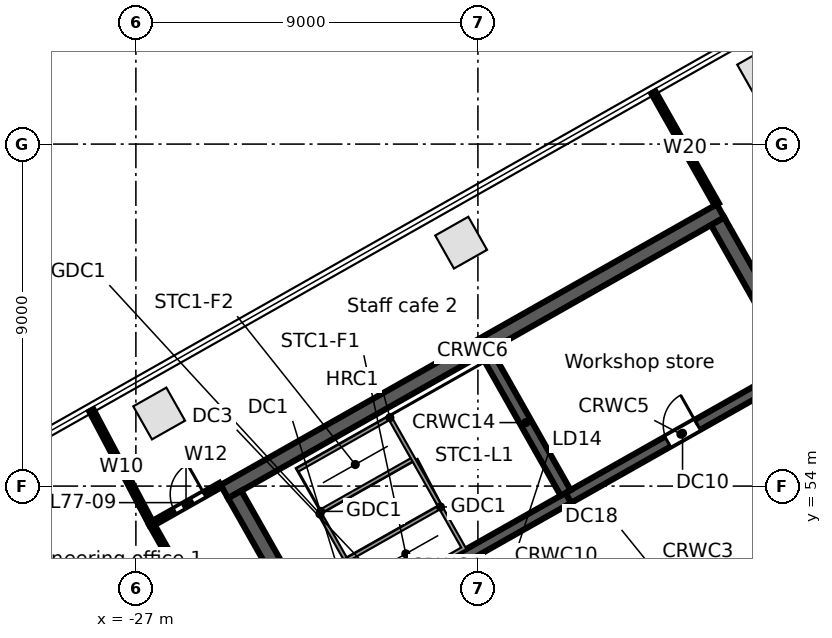
"""IFC4 building model, lengths in metres.
Left out: names, types, materials, properties, quantities, classifications, styles, units other than length and angle.
Written with IfcOpenShell. Run it as: python <this file> out.ifc"""

import sys

from ifc_helpers import new_model, si_unit, direction, frame, frame_2d, origin, origin_2d, place, context, subcontext, project, spatial, rectangle, extrude, element, fill, save


model = new_model("IFC4")
c1 = context("Model", 3, precision=1e-05, world=origin(), true_north=direction((0.0, 1.0)))
c2 = subcontext(c1, "Body", "Model", "MODEL_VIEW")
j1 = project(units=[si_unit("LENGTHUNIT", "METRE"), si_unit("PLANEANGLEUNIT", "RADIAN")], contexts=[c1])
p1 = place(None, origin())
s1 = spatial("IfcSite", under=j1, at=p1, CompositionType="ELEMENT")
p2 = place(p1, origin())
s2 = spatial("IfcBuilding", under=s1, at=p2, CompositionType="ELEMENT")
p3 = place(p2, frame((0.0, 0.0, 339.3)))
s3 = spatial("IfcBuildingStorey", under=s2, at=p3, CompositionType="ELEMENT", Elevation=339.3)
for number, where, z_axis, x_axis in (
    (1, (-10.495, 64.902, 0.0), (0.0, 0.0, 1.0), (-0.87, -0.492, 0.0)),
    (2, (-18.441, 60.406, 0.0), (0.0, 0.0, 1.0), (-0.87, -0.492, 0.0)),
    (3, (-26.388, 55.91, 0.0), (0.0, 0.0, 1.0), (-0.87, -0.492, 0.0)),
):
    element("IfcColumn", number, at=place(p3, frame(where, z_axis=z_axis, x_axis=x_axis)), inside=s3, PredefinedType="COLUMN", context=c2, shape_type="SweptSolid", body=[
        extrude(rectangle(XDim=1.0, YDim=1.0, at=origin_2d()), origin(), (0.0, 0.0, 1.0), 3.8),
    ])
p4 = place(p3, frame((-13.365, 49.911, 0.0), z_axis=(0.0, 0.0, 1.0), x_axis=(0.870347618718, 0.492437836272, 0.0)))
e4 = element("IfcWall", 4, at=p4, inside=s3, PredefinedType="SOLIDWALL", context=c2, shape_type="SweptSolid", body=[
    extrude(rectangle(XDim=6.7, YDim=0.3, at=frame_2d((3.35, 0.0))), origin(), (0.0, 0.0, 1.0), 3.52),
])
p5 = place(p4, frame((0.75, 0.0, 0.0)))
e5 = element("IfcOpeningElement", 5, at=p5, cuts=e4, PredefinedType="OPENING", context=c2, shape_type="SweptSolid", body=[
    extrude(rectangle(XDim=0.9, YDim=2.1, at=frame_2d((0.45, 1.05))), frame((0.0, 0.16, 0.0), z_axis=(0.0, -1.0, 0.0), x_axis=(1.0, 0.0, 0.0)), (0.0, 0.0, 1.0), 0.32),
])
p6 = place(p4, frame((3.15, 0.0, 0.0)))
e6 = element("IfcOpeningElement", 6, at=p6, cuts=e4, PredefinedType="OPENING", context=c2, shape_type="SweptSolid", body=[
    extrude(rectangle(XDim=0.9, YDim=2.1, at=frame_2d((0.45, 1.05))), frame((0.0, 0.16, 0.0), z_axis=(0.0, -1.0, 0.0), x_axis=(1.0, 0.0, 0.0)), (0.0, 0.0, 1.0), 0.32),
])
p7 = place(p4, frame((5.35, 0.0, 0.0)))
e7 = element("IfcOpeningElement", 7, at=p7, cuts=e4, PredefinedType="OPENING", context=c2, shape_type="SweptSolid", body=[
    extrude(rectangle(XDim=0.9, YDim=2.1, at=frame_2d((0.45, 1.05))), frame((0.0, 0.16, 0.0), z_axis=(0.0, -1.0, 0.0), x_axis=(1.0, 0.0, 0.0)), (0.0, 0.0, 1.0), 0.32),
])
p8 = place(p3, frame((-22.059, 50.047, 0.0), z_axis=(0.0, 0.0, 1.0), x_axis=(0.87035077051, 0.49243226567, 0.0)))
e8 = element("IfcWall", 8, at=p8, inside=s3, PredefinedType="SOLIDWALL", context=c2, shape_type="SweptSolid", body=[
    extrude(rectangle(XDim=7.4, YDim=0.3, at=frame_2d((3.7, 0.0))), origin(), (0.0, 0.0, 1.0), 3.52),
])
p9 = place(p8, frame((0.4, 0.0, 0.0)))
e9 = element("IfcOpeningElement", 9, at=p9, cuts=e8, PredefinedType="OPENING", context=c2, shape_type="SweptSolid", body=[
    extrude(rectangle(XDim=1.0, YDim=2.1, at=frame_2d((0.5, 1.05))), frame((0.0, 0.16, 0.0), z_axis=(0.0, -1.0, 0.0), x_axis=(1.0, 0.0, 0.0)), (0.0, 0.0, 1.0), 0.32),
])
p10 = place(p3, frame((-15.618, 53.691, 0.0), z_axis=(0.0, 0.0, 1.0), x_axis=(0.870362830851, 0.492410948978, 0.0)))
e10 = element("IfcWall", 10, at=p10, inside=s3, PredefinedType="SOLIDWALL", context=c2, shape_type="SweptSolid", body=[
    extrude(rectangle(XDim=6.8, YDim=0.3, at=frame_2d((3.4, 0.0))), origin(), (0.0, 0.0, 1.0), 3.52),
])
p11 = place(p10, frame((3.0, 0.0, 0.0)))
e11 = element("IfcOpeningElement", 11, at=p11, cuts=e10, PredefinedType="OPENING", context=c2, shape_type="SweptSolid", body=[
    extrude(rectangle(XDim=0.9, YDim=2.1, at=frame_2d((0.45, 1.05))), frame((0.0, 0.16, 0.0), z_axis=(0.0, -1.0, 0.0), x_axis=(1.0, 0.0, 0.0)), (0.0, 0.0, 1.0), 0.32),
])
p12 = place(p3, frame((-24.672, 53.854, 0.0), z_axis=(0.0, 0.0, 1.0), x_axis=(0.870353598469, 0.492427267353, 0.0)))
e12 = element("IfcWall", 12, at=p12, inside=s3, PredefinedType="SOLIDWALL", context=c2, shape_type="SweptSolid", body=[
    extrude(rectangle(XDim=15.0, YDim=0.4, at=frame_2d((7.5, 0.0))), origin(), (0.0, 0.0, 1.0), 3.52),
])
p13 = place(p3, frame((-24.4, 53.779, 0.0), z_axis=(0.0, 0.0, 1.0), x_axis=(0.492421663121, -0.870356769198, 0.0)))
e13 = element("IfcWall", 13, at=p13, inside=s3, PredefinedType="SOLIDWALL", context=c2, shape_type="SweptSolid", body=[
    extrude(rectangle(XDim=13.2, YDim=0.4, at=frame_2d((6.6, 0.0))), origin(), (0.0, 0.0, 1.0), 3.52),
])
p14 = place(p3, frame((-17.785, 57.521, 0.0), z_axis=(0.0, 0.0, 1.0), x_axis=(0.492422543467, -0.870356271124, 0.0)))
e14 = element("IfcWall", 14, at=p14, inside=s3, PredefinedType="SOLIDWALL", context=c2, shape_type="SweptSolid", body=[
    extrude(rectangle(XDim=4.25, YDim=0.3, at=frame_2d((2.125, 0.0))), origin(), (0.0, 0.0, 1.0), 3.52),
])
p15 = place(p3, frame((-11.692, 60.968, 0.0), z_axis=(0.0, 0.0, 1.0), x_axis=(0.492421663121, -0.870356769198, 0.0)))
e15 = element("IfcWall", 15, at=p15, inside=s3, PredefinedType="SOLIDWALL", context=c2, shape_type="SweptSolid", body=[
    extrude(rectangle(XDim=13.2, YDim=0.4, at=frame_2d((6.6, 0.0))), origin(), (0.0, 0.0, 1.0), 3.52),
])
p16 = place(p3, frame((-28.171, 55.993, 0.0), z_axis=(0.0, 0.0, 1.0), x_axis=(0.466919980712, -0.884299571193, 0.0)))
e16 = element("IfcWall", 16, at=p16, inside=s3, PredefinedType="PARTITIONING", context=c2, shape_type="SweptSolid", body=[
    extrude(rectangle(XDim=3.385, YDim=0.125, at=frame_2d((1.693, 0.0))), origin(), (0.0, 0.0, 1.0), 2.888),
])
p17 = place(p3, frame((-26.59, 52.999, 0.0), z_axis=(0.0, 0.0, 1.0), x_axis=(0.870384380082, 0.492372857609, 0.0)))
e17 = element("IfcWall", 17, at=p17, inside=s3, PredefinedType="PARTITIONING", context=c2, shape_type="SweptSolid", body=[
    extrude(rectangle(XDim=2.09, YDim=0.125, at=frame_2d((1.045, 0.0))), origin(), (0.0, 0.0, 1.0), 2.792),
])
p18 = place(p17, frame((0.7, 0.0, 0.0)))
e18 = element("IfcOpeningElement", 18, at=p18, cuts=e17, PredefinedType="OPENING", context=c2, shape_type="SweptSolid", body=[
    extrude(rectangle(XDim=0.9, YDim=2.1, at=frame_2d((0.45, 1.05))), frame((0.0, 0.073, 0.0), z_axis=(0.0, -1.0, 0.0), x_axis=(1.0, 0.0, 0.0)), (0.0, 0.0, 1.0), 0.145),
])
p19 = place(p3, frame((-26.59, 52.999, 0.0), z_axis=(0.0, 0.0, 1.0), x_axis=(0.492406341242, -0.870365437678, 0.0)))
e19 = element("IfcWall", 19, at=p19, inside=s3, PredefinedType="PARTITIONING", context=c2, shape_type="SweptSolid", body=[
    extrude(rectangle(XDim=5.0, YDim=0.125, at=frame_2d((2.5, 0.0))), origin(), (0.0, 0.0, 1.0), 3.52),
])
p20 = place(p19, frame((1.95, 0.0, 0.0)))
e20 = element("IfcOpeningElement", 20, at=p20, cuts=e19, PredefinedType="OPENING", context=c2, shape_type="SweptSolid", body=[
    extrude(rectangle(XDim=0.9, YDim=2.1, at=frame_2d((0.45, 1.05))), frame((0.0, 0.073, 0.0), z_axis=(0.0, -1.0, 0.0), x_axis=(1.0, 0.0, 0.0)), (0.0, 0.0, 1.0), 0.145),
])
p21 = place(p3, frame((-13.382, 64.36, 0.0), z_axis=(0.0, 0.0, 1.0), x_axis=(0.492468354667, -0.870330350874, 0.0)))
e21 = element("IfcWall", 21, at=p21, inside=s3, PredefinedType="PARTITIONING", context=c2, shape_type="SweptSolid", body=[
    extrude(rectangle(XDim=3.385, YDim=0.125, at=frame_2d((1.692, 0.0))), origin(), (0.0, 0.0, 1.0), 2.888),
])
p22 = place(p11, origin())
e22 = element("IfcDoor", 22, at=p22, inside=s3, OperationType="SINGLE_SWING_RIGHT", PredefinedType="DOOR", context=c2, shape_type="SweptSolid", body=[
    extrude(rectangle(XDim=0.9, YDim=2.1, at=frame_2d((0.45, 1.05))), frame((0.0, 0.025, 0.0), z_axis=(0.0, -1.0, 0.0), x_axis=(1.0, 0.0, 0.0)), (0.0, 0.0, 1.0), 0.05),
])
fill(e11, e22)
p23 = place(p18, origin())
e23 = element("IfcDoor", 23, at=p23, inside=s3, OperationType="SINGLE_SWING_RIGHT", PredefinedType="DOOR", context=c2, shape_type="SweptSolid", body=[
    extrude(rectangle(XDim=0.9, YDim=2.1, at=frame_2d((0.45, 1.05))), frame((0.0, 0.025, 0.0), z_axis=(0.0, -1.0, 0.0), x_axis=(1.0, 0.0, 0.0)), (0.0, 0.0, 1.0), 0.05),
])
fill(e18, e23)
save(model, sys.argv[1])
